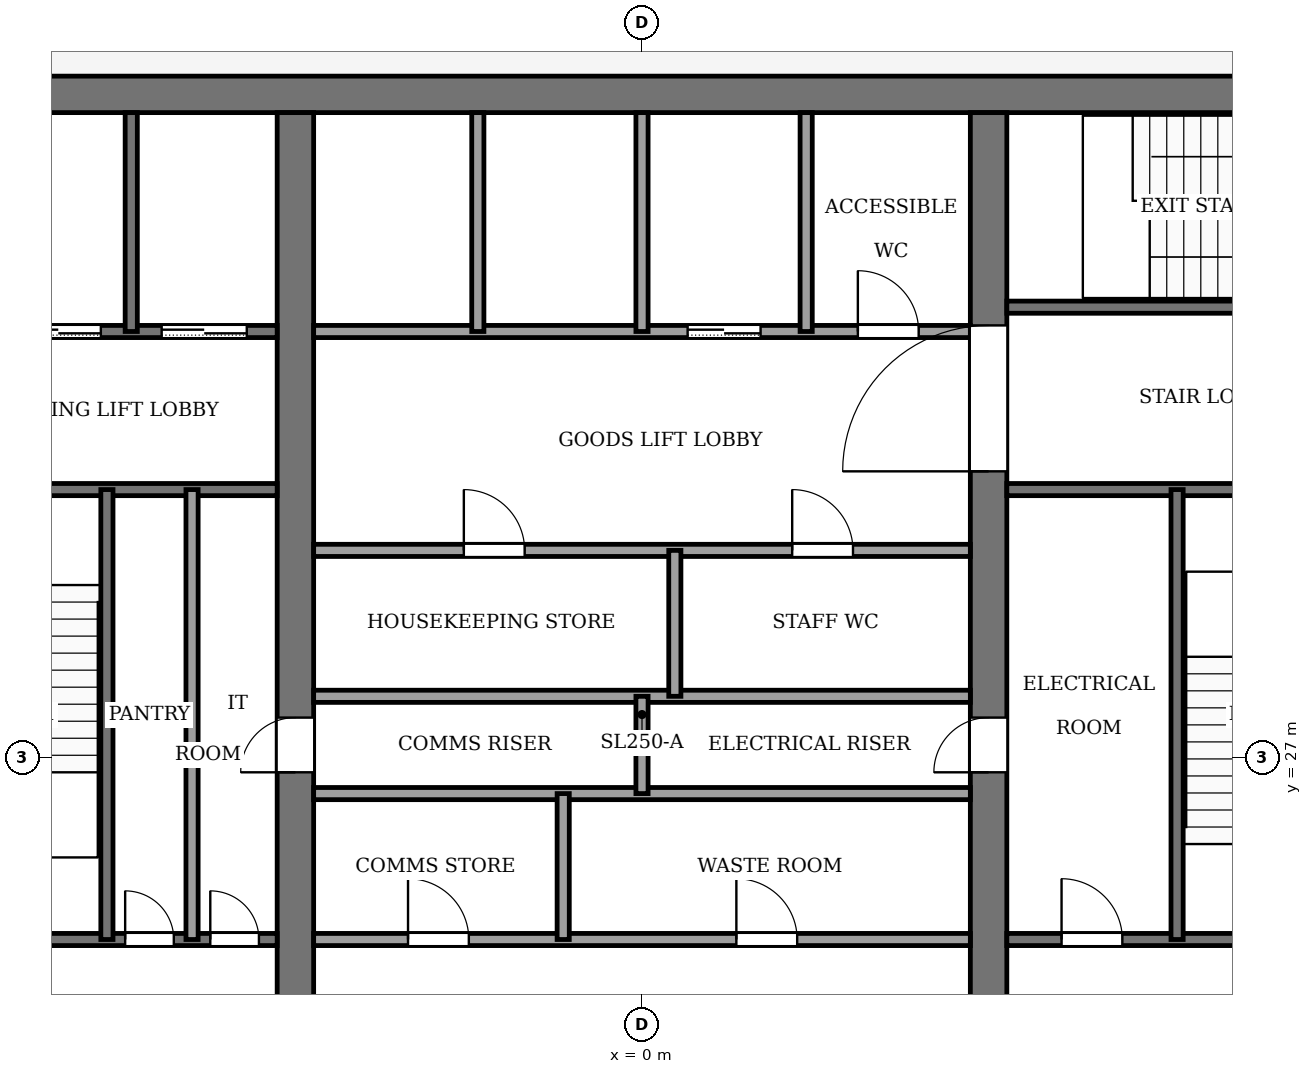
"""IFC4 building model, lengths in metres.
Left out: names, types, materials, properties, quantities, classifications, styles, units other than length and angle.
Written with IfcOpenShell. Run it as: python <this file> out.ifc"""

import sys

from ifc_helpers import new_model, si_unit, direction, frame, frame_2d, origin, place, context, subcontext, project, spatial, rectangle, extrude, element, fill, save


model = new_model("IFC4")
c1 = context("Model", 3, precision=1e-05, world=origin(), true_north=direction((0.0, 1.0)))
c2 = subcontext(c1, "Body", "Model", "MODEL_VIEW")
j1 = project(units=[si_unit("LENGTHUNIT", "METRE"), si_unit("PLANEANGLEUNIT", "RADIAN")], contexts=[c1])
p1 = place(None, origin())
s1 = spatial("IfcSite", under=j1, at=p1, CompositionType="ELEMENT")
p2 = place(p1, origin())
s2 = spatial("IfcBuilding", under=s1, at=p2, CompositionType="ELEMENT")
p3 = place(p2, frame((0.0, 0.0, 318.0)))
s3 = spatial("IfcBuildingStorey", under=s2, at=p3, CompositionType="ELEMENT", Elevation=318.0)
p4 = place(p3, frame((-13.2, 37.9, -0.13), z_axis=(0.0, 0.0, 1.0), x_axis=(1.0, 0.0, 0.0)))
e1 = element("IfcWall", 1, at=p4, inside=s3, PredefinedType="SHEAR", context=c2, shape_type="SweptSolid", body=[
    extrude(rectangle(XDim=26.4, YDim=0.6, at=frame_2d((13.2, 0.0))), origin(), (0.0, 0.0, 1.0), 4.0),
])
p5 = place(p3, frame((-5.7, 18.4, -0.13), z_axis=(0.0, 0.0, 1.0), x_axis=(0.0, 1.0, 0.0)))
e2 = element("IfcWall", 2, at=p5, inside=s3, PredefinedType="SHEAR", context=c2, shape_type="SweptSolid", body=[
    extrude(rectangle(XDim=19.2, YDim=0.6, at=frame_2d((9.6, 0.0))), origin(), (0.0, 0.0, 1.0), 4.0),
])
p6 = place(p5, frame((8.35, 0.0, 0.13)))
e3 = element("IfcOpeningElement", 3, at=p6, cuts=e2, PredefinedType="OPENING", context=c2, shape_type="SweptSolid", body=[
    extrude(rectangle(XDim=0.9, YDim=2.1, at=frame_2d((0.45, 1.05))), frame((0.0, 0.31, 0.0), z_axis=(0.0, -1.0, 0.0), x_axis=(1.0, 0.0, 0.0)), (0.0, 0.0, 1.0), 0.62),
])
p7 = place(p3, frame((5.7, 18.4, -0.13), z_axis=(0.0, 0.0, 1.0), x_axis=(0.0, 1.0, 0.0)))
e4 = element("IfcWall", 4, at=p7, inside=s3, PredefinedType="SHEAR", context=c2, shape_type="SweptSolid", body=[
    extrude(rectangle(XDim=19.2, YDim=0.6, at=frame_2d((9.6, 0.0))), origin(), (0.0, 0.0, 1.0), 4.0),
])
p8 = place(p7, frame((8.35, 0.0, 0.13)))
e5 = element("IfcOpeningElement", 5, at=p8, cuts=e4, PredefinedType="OPENING", context=c2, shape_type="SweptSolid", body=[
    extrude(rectangle(XDim=0.9, YDim=2.1, at=frame_2d((0.45, 1.05))), frame((0.0, 0.31, 0.0), z_axis=(0.0, -1.0, 0.0), x_axis=(1.0, 0.0, 0.0)), (0.0, 0.0, 1.0), 0.62),
])
p9 = place(p7, frame((13.3, 0.0, 0.13)))
e6 = element("IfcOpeningElement", 6, at=p9, cuts=e4, PredefinedType="OPENING", context=c2, shape_type="SweptSolid", body=[
    extrude(rectangle(XDim=2.4, YDim=2.4, at=frame_2d((1.2, 1.2))), frame((0.0, 0.31, 0.0), z_axis=(0.0, -1.0, 0.0), x_axis=(1.0, 0.0, 0.0)), (0.0, 0.0, 1.0), 0.62),
])
p10 = place(p3, frame((-12.6, 24.0, 0.0), z_axis=(0.0, 0.0, 1.0), x_axis=(1.0, 0.0, 0.0)))
e7 = element("IfcWall", 7, at=p10, inside=s3, PredefinedType="PARTITIONING", context=c2, shape_type="SweptSolid", body=[
    extrude(rectangle(XDim=6.6, YDim=0.2, at=frame_2d((3.3, 0.0))), origin(), (0.0, 0.0, 1.0), 3.87),
])
p11 = place(p10, frame((4.1, 0.0, 0.0)))
e8 = element("IfcOpeningElement", 8, at=p11, cuts=e7, PredefinedType="OPENING", context=c2, shape_type="SweptSolid", body=[
    extrude(rectangle(XDim=0.8, YDim=2.1, at=frame_2d((0.4, 1.05))), frame((0.0, 0.11, 0.0), z_axis=(0.0, -1.0, 0.0), x_axis=(1.0, 0.0, 0.0)), (0.0, 0.0, 1.0), 0.22),
])
p12 = place(p10, frame((5.5, 0.0, 0.0)))
e9 = element("IfcOpeningElement", 9, at=p12, cuts=e7, PredefinedType="OPENING", context=c2, shape_type="SweptSolid", body=[
    extrude(rectangle(XDim=0.8, YDim=2.1, at=frame_2d((0.4, 1.05))), frame((0.0, 0.11, 0.0), z_axis=(0.0, -1.0, 0.0), x_axis=(1.0, 0.0, 0.0)), (0.0, 0.0, 1.0), 0.22),
])
p13 = place(p3, frame((-5.4, 24.0, 0.0), z_axis=(0.0, 0.0, 1.0), x_axis=(1.0, 0.0, 0.0)))
e10 = element("IfcWall", 10, at=p13, inside=s3, PredefinedType="PARTITIONING", context=c2, shape_type="SweptSolid", body=[
    extrude(rectangle(XDim=10.8, YDim=0.2, at=frame_2d((5.4, 0.0))), origin(), (0.0, 0.0, 1.0), 3.87),
])
p14 = place(p13, frame((1.552, 0.0, 0.0)))
e11 = element("IfcOpeningElement", 11, at=p14, cuts=e10, PredefinedType="OPENING", context=c2, shape_type="SweptSolid", body=[
    extrude(rectangle(XDim=1.0, YDim=2.1, at=frame_2d((0.5, 1.05))), frame((0.0, 0.11, 0.0), z_axis=(0.0, -1.0, 0.0), x_axis=(1.0, 0.0, 0.0)), (0.0, 0.0, 1.0), 0.22),
])
p15 = place(p13, frame((6.952, 0.0, 0.0)))
e12 = element("IfcOpeningElement", 12, at=p15, cuts=e10, PredefinedType="OPENING", context=c2, shape_type="SweptSolid", body=[
    extrude(rectangle(XDim=1.0, YDim=2.1, at=frame_2d((0.5, 1.05))), frame((0.0, 0.11, 0.0), z_axis=(0.0, -1.0, 0.0), x_axis=(1.0, 0.0, 0.0)), (0.0, 0.0, 1.0), 0.22),
])
p16 = place(p3, frame((6.0, 24.0, 0.0), z_axis=(0.0, 0.0, 1.0), x_axis=(1.0, 0.0, 0.0)))
e13 = element("IfcWall", 13, at=p16, inside=s3, PredefinedType="PARTITIONING", context=c2, shape_type="SweptSolid", body=[
    extrude(rectangle(XDim=6.6, YDim=0.2, at=frame_2d((3.3, 0.0))), origin(), (0.0, 0.0, 1.0), 3.87),
])
p17 = place(p16, frame((0.9, 0.0, 0.0)))
e14 = element("IfcOpeningElement", 14, at=p17, cuts=e13, PredefinedType="OPENING", context=c2, shape_type="SweptSolid", body=[
    extrude(rectangle(XDim=1.0, YDim=2.1, at=frame_2d((0.5, 1.05))), frame((0.0, 0.11, 0.0), z_axis=(0.0, -1.0, 0.0), x_axis=(1.0, 0.0, 0.0)), (0.0, 0.0, 1.0), 0.22),
])
p18 = place(p16, frame((4.4, 0.0, 0.0)))
e15 = element("IfcOpeningElement", 15, at=p18, cuts=e13, PredefinedType="OPENING", context=c2, shape_type="SweptSolid", body=[
    extrude(rectangle(XDim=1.2, YDim=2.2, at=frame_2d((0.6, 1.1))), frame((0.0, 0.11, 0.0), z_axis=(0.0, -1.0, 0.0), x_axis=(1.0, 0.0, 0.0)), (0.0, 0.0, 1.0), 0.22),
])
for number, where, z_axis, x_axis in (
    (16, (-5.4, 26.4, 0.0), (0.0, 0.0, 1.0), (1.0, 0.0, 0.0)),
    (17, (-5.4, 28.0, 0.0), (0.0, 0.0, 1.0), (1.0, 0.0, 0.0)),
):
    element("IfcWall", number, at=place(p3, frame(where, z_axis=z_axis, x_axis=x_axis)), inside=s3, PredefinedType="PARTITIONING", context=c2, shape_type="SweptSolid", body=[
        extrude(rectangle(XDim=10.8, YDim=0.2, at=frame_2d((5.4, 0.0))), origin(), (0.0, 0.0, 1.0), 3.87),
    ])
p19 = place(p3, frame((-5.4, 30.4, 0.0), z_axis=(0.0, 0.0, 1.0), x_axis=(1.0, 0.0, 0.0)))
e18 = element("IfcWall", 18, at=p19, inside=s3, PredefinedType="PARTITIONING", context=c2, shape_type="SweptSolid", body=[
    extrude(rectangle(XDim=10.8, YDim=0.2, at=frame_2d((5.4, 0.0))), origin(), (0.0, 0.0, 1.0), 3.87),
])
p20 = place(p19, frame((2.47, 0.0, 0.0)))
e19 = element("IfcOpeningElement", 19, at=p20, cuts=e18, PredefinedType="OPENING", context=c2, shape_type="SweptSolid", body=[
    extrude(rectangle(XDim=1.0, YDim=2.1, at=frame_2d((0.5, 1.05))), frame((0.0, 0.11, 0.0), z_axis=(0.0, -1.0, 0.0), x_axis=(1.0, 0.0, 0.0)), (0.0, 0.0, 1.0), 0.22),
])
p21 = place(p19, frame((7.87, 0.0, 0.0)))
e20 = element("IfcOpeningElement", 20, at=p21, cuts=e18, PredefinedType="OPENING", context=c2, shape_type="SweptSolid", body=[
    extrude(rectangle(XDim=1.0, YDim=2.1, at=frame_2d((0.5, 1.05))), frame((0.0, 0.11, 0.0), z_axis=(0.0, -1.0, 0.0), x_axis=(1.0, 0.0, 0.0)), (0.0, 0.0, 1.0), 0.22),
])
p22 = place(p3, frame((-12.6, 31.4, 0.0), z_axis=(0.0, 0.0, 1.0), x_axis=(1.0, 0.0, 0.0)))
e21 = element("IfcWall", 21, at=p22, inside=s3, PredefinedType="PARTITIONING", context=c2, shape_type="SweptSolid", body=[
    extrude(rectangle(XDim=6.6, YDim=0.2, at=frame_2d((3.3, 0.0))), origin(), (0.0, 0.0, 1.0), 3.87),
])
p23 = place(p22, frame((1.0, 0.0, 0.0)))
e22 = element("IfcOpeningElement", 22, at=p23, cuts=e21, PredefinedType="OPENING", context=c2, shape_type="SweptSolid", body=[
    extrude(rectangle(XDim=1.2, YDim=2.2, at=frame_2d((0.6, 1.1))), frame((0.0, 0.11, 0.0), z_axis=(0.0, -1.0, 0.0), x_axis=(1.0, 0.0, 0.0)), (0.0, 0.0, 1.0), 0.22),
])
p24 = place(p3, frame((6.0, 31.4, 0.0), z_axis=(0.0, 0.0, 1.0), x_axis=(1.0, 0.0, 0.0)))
e23 = element("IfcWall", 23, at=p24, inside=s3, PredefinedType="PARTITIONING", context=c2, shape_type="SweptSolid", body=[
    extrude(rectangle(XDim=6.6, YDim=0.2, at=frame_2d((3.3, 0.0))), origin(), (0.0, 0.0, 1.0), 3.87),
])
p25 = place(p3, frame((-12.6, 34.0, 0.0), z_axis=(0.0, 0.0, 1.0), x_axis=(1.0, 0.0, 0.0)))
e24 = element("IfcWall", 24, at=p25, inside=s3, PredefinedType="PARTITIONING", context=c2, shape_type="SweptSolid", body=[
    extrude(rectangle(XDim=6.6, YDim=0.2, at=frame_2d((3.3, 0.0))), origin(), (0.0, 0.0, 1.0), 3.87),
])
p26 = place(p25, frame((4.7, 0.0, 0.0)))
e25 = element("IfcOpeningElement", 25, at=p26, cuts=e24, PredefinedType="OPENING", context=c2, shape_type="SweptSolid", body=[
    extrude(rectangle(XDim=1.4, YDim=2.2, at=frame_2d((0.7, 1.1))), frame((0.0, 0.11, 0.0), z_axis=(0.0, -1.0, 0.0), x_axis=(1.0, 0.0, 0.0)), (0.0, 0.0, 1.0), 0.22),
])
p27 = place(p25, frame((2.3, 0.0, 0.0)))
e26 = element("IfcOpeningElement", 26, at=p27, cuts=e24, PredefinedType="OPENING", context=c2, shape_type="SweptSolid", body=[
    extrude(rectangle(XDim=1.4, YDim=2.2, at=frame_2d((0.7, 1.1))), frame((0.0, 0.11, 0.0), z_axis=(0.0, -1.0, 0.0), x_axis=(1.0, 0.0, 0.0)), (0.0, 0.0, 1.0), 0.22),
])
p28 = place(p25, frame((0.45, 0.0, 0.0)))
e27 = element("IfcOpeningElement", 27, at=p28, cuts=e24, PredefinedType="OPENING", context=c2, shape_type="SweptSolid", body=[
    extrude(rectangle(XDim=0.9, YDim=2.1, at=frame_2d((0.45, 1.05))), frame((0.0, 0.11, 0.0), z_axis=(0.0, -1.0, 0.0), x_axis=(1.0, 0.0, 0.0)), (0.0, 0.0, 1.0), 0.22),
])
p29 = place(p3, frame((-5.4, 34.0, 0.0), z_axis=(0.0, 0.0, 1.0), x_axis=(1.0, 0.0, 0.0)))
e28 = element("IfcWall", 28, at=p29, inside=s3, PredefinedType="PARTITIONING", context=c2, shape_type="SweptSolid", body=[
    extrude(rectangle(XDim=10.8, YDim=0.2, at=frame_2d((5.4, 0.0))), origin(), (0.0, 0.0, 1.0), 3.87),
])
p30 = place(p29, frame((6.15, 0.0, 0.0)))
e29 = element("IfcOpeningElement", 29, at=p30, cuts=e28, PredefinedType="OPENING", context=c2, shape_type="SweptSolid", body=[
    extrude(rectangle(XDim=1.2, YDim=2.2, at=frame_2d((0.6, 1.1))), frame((0.0, 0.11, 0.0), z_axis=(0.0, -1.0, 0.0), x_axis=(1.0, 0.0, 0.0)), (0.0, 0.0, 1.0), 0.22),
])
p31 = place(p29, frame((8.95, 0.0, 0.0)))
e30 = element("IfcOpeningElement", 30, at=p31, cuts=e28, PredefinedType="OPENING", context=c2, shape_type="SweptSolid", body=[
    extrude(rectangle(XDim=1.0, YDim=2.1, at=frame_2d((0.5, 1.05))), frame((0.0, 0.11, 0.0), z_axis=(0.0, -1.0, 0.0), x_axis=(1.0, 0.0, 0.0)), (0.0, 0.0, 1.0), 0.22),
])
p32 = place(p3, frame((6.0, 34.4, 0.0), z_axis=(0.0, 0.0, 1.0), x_axis=(1.0, 0.0, 0.0)))
e31 = element("IfcWall", 31, at=p32, inside=s3, PredefinedType="PARTITIONING", context=c2, shape_type="SweptSolid", body=[
    extrude(rectangle(XDim=6.6, YDim=0.2, at=frame_2d((3.3, 0.0))), origin(), (0.0, 0.0, 1.0), 3.87),
])
p33 = place(p32, frame((4.8, 0.0, 0.0)))
e32 = element("IfcOpeningElement", 32, at=p33, cuts=e31, PredefinedType="OPENING", context=c2, shape_type="SweptSolid", body=[
    extrude(rectangle(XDim=1.2, YDim=2.2, at=frame_2d((0.6, 1.1))), frame((0.0, 0.11, 0.0), z_axis=(0.0, -1.0, 0.0), x_axis=(1.0, 0.0, 0.0)), (0.0, 0.0, 1.0), 0.22),
])
p34 = place(p3, frame((-8.8, 24.0, 0.0), z_axis=(0.0, 0.0, 1.0), x_axis=(0.0, 1.0, 0.0)))
e33 = element("IfcWall", 33, at=p34, inside=s3, PredefinedType="PARTITIONING", context=c2, shape_type="SweptSolid", body=[
    extrude(rectangle(XDim=7.4, YDim=0.2, at=frame_2d((3.7, 0.0))), origin(), (0.0, 0.0, 1.0), 3.87),
])
p35 = place(p3, frame((-8.4, 34.0, 0.0), z_axis=(0.0, 0.0, 1.0), x_axis=(0.0, 1.0, 0.0)))
e34 = element("IfcWall", 34, at=p35, inside=s3, PredefinedType="PARTITIONING", context=c2, shape_type="SweptSolid", body=[
    extrude(rectangle(XDim=3.6, YDim=0.2, at=frame_2d((1.8, 0.0))), origin(), (0.0, 0.0, 1.0), 3.87),
])
p36 = place(p3, frame((-7.4, 24.0, 0.0), z_axis=(0.0, 0.0, 1.0), x_axis=(0.0, 1.0, 0.0)))
e35 = element("IfcWall", 35, at=p36, inside=s3, PredefinedType="PARTITIONING", context=c2, shape_type="SweptSolid", body=[
    extrude(rectangle(XDim=7.4, YDim=0.2, at=frame_2d((3.7, 0.0))), origin(), (0.0, 0.0, 1.0), 3.87),
])
p37 = place(p3, frame((-2.7, 34.0, 0.0), z_axis=(0.0, 0.0, 1.0), x_axis=(0.0, 1.0, 0.0)))
e36 = element("IfcWall", 36, at=p37, inside=s3, PredefinedType="PARTITIONING", context=c2, shape_type="SweptSolid", body=[
    extrude(rectangle(XDim=3.6, YDim=0.2, at=frame_2d((1.8, 0.0))), origin(), (0.0, 0.0, 1.0), 3.87),
])
p38 = place(p3, frame((-1.296, 24.0, 0.0), z_axis=(0.0, 0.0, 1.0), x_axis=(0.0, 1.0, 0.0)))
e37 = element("IfcWall", 37, at=p38, inside=s3, PredefinedType="PARTITIONING", context=c2, shape_type="SweptSolid", body=[
    extrude(rectangle(XDim=2.4, YDim=0.2, at=frame_2d((1.2, 0.0))), origin(), (0.0, 0.0, 1.0), 3.87),
])
p39 = place(p3, frame((0.0, 26.4, 0.0), z_axis=(0.0, 0.0, 1.0), x_axis=(0.0, 1.0, 0.0)))
e38 = element("IfcWall", 38, at=p39, inside=s3, PredefinedType="PARTITIONING", context=c2, shape_type="SweptSolid", body=[
    extrude(rectangle(XDim=1.6, YDim=0.2, at=frame_2d((0.8, 0.0))), origin(), (0.0, 0.0, 1.0), 3.87),
])
p40 = place(p3, frame((0.0, 34.0, 0.0), z_axis=(0.0, 0.0, 1.0), x_axis=(0.0, 1.0, 0.0)))
e39 = element("IfcWall", 39, at=p40, inside=s3, PredefinedType="PARTITIONING", context=c2, shape_type="SweptSolid", body=[
    extrude(rectangle(XDim=3.6, YDim=0.2, at=frame_2d((1.8, 0.0))), origin(), (0.0, 0.0, 1.0), 3.87),
])
p41 = place(p3, frame((0.54, 28.0, 0.0), z_axis=(0.0, 0.0, 1.0), x_axis=(0.0, 1.0, 0.0)))
e40 = element("IfcWall", 40, at=p41, inside=s3, PredefinedType="PARTITIONING", context=c2, shape_type="SweptSolid", body=[
    extrude(rectangle(XDim=2.4, YDim=0.2, at=frame_2d((1.2, 0.0))), origin(), (0.0, 0.0, 1.0), 3.87),
])
p42 = place(p3, frame((2.7, 34.0, 0.0), z_axis=(0.0, 0.0, 1.0), x_axis=(0.0, 1.0, 0.0)))
e41 = element("IfcWall", 41, at=p42, inside=s3, PredefinedType="PARTITIONING", context=c2, shape_type="SweptSolid", body=[
    extrude(rectangle(XDim=3.6, YDim=0.2, at=frame_2d((1.8, 0.0))), origin(), (0.0, 0.0, 1.0), 3.87),
])
p43 = place(p3, frame((8.8, 24.0, 0.0), z_axis=(0.0, 0.0, 1.0), x_axis=(0.0, 1.0, 0.0)))
e42 = element("IfcWall", 42, at=p43, inside=s3, PredefinedType="PARTITIONING", context=c2, shape_type="SweptSolid", body=[
    extrude(rectangle(XDim=7.4, YDim=0.2, at=frame_2d((3.7, 0.0))), origin(), (0.0, 0.0, 1.0), 3.87),
])
p44 = place(p30, origin())
e43 = element("IfcDoor", 43, at=p44, inside=s3, OperationType="SLIDING_TO_LEFT", PredefinedType="DOOR", context=c2, shape_type="SweptSolid", body=[
    extrude(rectangle(XDim=1.2, YDim=2.2, at=frame_2d((0.6, 1.1))), frame((0.0, 0.025, 0.0), z_axis=(0.0, -1.0, 0.0), x_axis=(1.0, 0.0, 0.0)), (0.0, 0.0, 1.0), 0.05),
])
fill(e29, e43)
p45 = place(p26, origin())
e44 = element("IfcDoor", 44, at=p45, inside=s3, OperationType="SLIDING_TO_LEFT", PredefinedType="DOOR", context=c2, shape_type="SweptSolid", body=[
    extrude(rectangle(XDim=1.4, YDim=2.2, at=frame_2d((0.7, 1.1))), frame((0.0, 0.025, 0.0), z_axis=(0.0, -1.0, 0.0), x_axis=(1.0, 0.0, 0.0)), (0.0, 0.0, 1.0), 0.05),
])
fill(e25, e44)
p46 = place(p27, origin())
e45 = element("IfcDoor", 45, at=p46, inside=s3, OperationType="SLIDING_TO_LEFT", PredefinedType="DOOR", context=c2, shape_type="SweptSolid", body=[
    extrude(rectangle(XDim=1.4, YDim=2.2, at=frame_2d((0.7, 1.1))), frame((0.0, 0.025, 0.0), z_axis=(0.0, -1.0, 0.0), x_axis=(1.0, 0.0, 0.0)), (0.0, 0.0, 1.0), 0.05),
])
fill(e26, e45)
p47 = place(p14, origin())
e46 = element("IfcDoor", 46, at=p47, inside=s3, OperationType="SINGLE_SWING_LEFT", PredefinedType="DOOR", context=c2, shape_type="SweptSolid", body=[
    extrude(rectangle(XDim=1.0, YDim=2.1, at=frame_2d((0.5, 1.05))), frame((0.0, 0.025, 0.0), z_axis=(0.0, -1.0, 0.0), x_axis=(1.0, 0.0, 0.0)), (0.0, 0.0, 1.0), 0.05),
])
fill(e11, e46)
p48 = place(p15, origin())
e47 = element("IfcDoor", 47, at=p48, inside=s3, OperationType="SINGLE_SWING_RIGHT", PredefinedType="DOOR", context=c2, shape_type="SweptSolid", body=[
    extrude(rectangle(XDim=1.0, YDim=2.1, at=frame_2d((0.5, 1.05))), frame((0.0, 0.025, 0.0), z_axis=(0.0, -1.0, 0.0), x_axis=(1.0, 0.0, 0.0)), (0.0, 0.0, 1.0), 0.05),
])
fill(e12, e47)
p49 = place(p20, origin())
e48 = element("IfcDoor", 48, at=p49, inside=s3, OperationType="SINGLE_SWING_RIGHT", PredefinedType="DOOR", context=c2, shape_type="SweptSolid", body=[
    extrude(rectangle(XDim=1.0, YDim=2.1, at=frame_2d((0.5, 1.05))), frame((0.0, 0.025, 0.0), z_axis=(0.0, -1.0, 0.0), x_axis=(1.0, 0.0, 0.0)), (0.0, 0.0, 1.0), 0.05),
])
fill(e19, e48)
p50 = place(p21, origin())
e49 = element("IfcDoor", 49, at=p50, inside=s3, OperationType="SINGLE_SWING_LEFT", PredefinedType="DOOR", context=c2, shape_type="SweptSolid", body=[
    extrude(rectangle(XDim=1.0, YDim=2.1, at=frame_2d((0.5, 1.05))), frame((0.0, 0.025, 0.0), z_axis=(0.0, -1.0, 0.0), x_axis=(1.0, 0.0, 0.0)), (0.0, 0.0, 1.0), 0.05),
])
fill(e20, e49)
p51 = place(p11, origin())
e50 = element("IfcDoor", 50, at=p51, inside=s3, OperationType="SINGLE_SWING_LEFT", PredefinedType="DOOR", context=c2, shape_type="SweptSolid", body=[
    extrude(rectangle(XDim=0.8, YDim=2.1, at=frame_2d((0.4, 1.05))), frame((0.0, 0.025, 0.0), z_axis=(0.0, -1.0, 0.0), x_axis=(1.0, 0.0, 0.0)), (0.0, 0.0, 1.0), 0.05),
])
fill(e8, e50)
p52 = place(p12, origin())
e51 = element("IfcDoor", 51, at=p52, inside=s3, OperationType="SINGLE_SWING_RIGHT", PredefinedType="DOOR", context=c2, shape_type="SweptSolid", body=[
    extrude(rectangle(XDim=0.8, YDim=2.1, at=frame_2d((0.4, 1.05))), frame((0.0, 0.025, 0.0), z_axis=(0.0, -1.0, 0.0), x_axis=(1.0, 0.0, 0.0)), (0.0, 0.0, 1.0), 0.05),
])
fill(e9, e51)
p53 = place(p17, origin())
e52 = element("IfcDoor", 52, at=p53, inside=s3, OperationType="SINGLE_SWING_RIGHT", PredefinedType="DOOR", context=c2, shape_type="SweptSolid", body=[
    extrude(rectangle(XDim=1.0, YDim=2.1, at=frame_2d((0.5, 1.05))), frame((0.0, 0.025, 0.0), z_axis=(0.0, -1.0, 0.0), x_axis=(1.0, 0.0, 0.0)), (0.0, 0.0, 1.0), 0.05),
])
fill(e14, e52)
p54 = place(p31, origin())
e53 = element("IfcDoor", 53, at=p54, inside=s3, OperationType="SINGLE_SWING_LEFT", PredefinedType="DOOR", context=c2, shape_type="SweptSolid", body=[
    extrude(rectangle(XDim=1.0, YDim=2.1, at=frame_2d((0.5, 1.05))), frame((0.0, 0.025, 0.0), z_axis=(0.0, -1.0, 0.0), x_axis=(1.0, 0.0, 0.0)), (0.0, 0.0, 1.0), 0.05),
])
fill(e30, e53)
p55 = place(p6, origin())
e54 = element("IfcDoor", 54, at=p55, inside=s3, OperationType="SINGLE_SWING_LEFT", PredefinedType="DOOR", context=c2, shape_type="SweptSolid", body=[
    extrude(rectangle(XDim=0.9, YDim=2.1, at=frame_2d((0.45, 1.05))), frame((0.0, 0.025, 0.0), z_axis=(0.0, -1.0, 0.0), x_axis=(1.0, 0.0, 0.0)), (0.0, 0.0, 1.0), 0.05),
])
fill(e3, e54)
p56 = place(p8, origin())
e55 = element("IfcDoor", 55, at=p56, inside=s3, OperationType="SINGLE_SWING_RIGHT", PredefinedType="DOOR", context=c2, shape_type="SweptSolid", body=[
    extrude(rectangle(XDim=0.9, YDim=2.1, at=frame_2d((0.45, 1.05))), frame((0.0, 0.025, 0.0), z_axis=(0.0, -1.0, 0.0), x_axis=(1.0, 0.0, 0.0)), (0.0, 0.0, 1.0), 0.05),
])
fill(e5, e55)
p57 = place(p9, origin())
e56 = element("IfcDoor", 56, at=p57, inside=s3, OperationType="DOUBLE_DOOR_SINGLE_SWING", PredefinedType="DOOR", context=c2, shape_type="SweptSolid", body=[
    extrude(rectangle(XDim=2.4, YDim=2.4, at=frame_2d((1.2, 1.2))), frame((0.0, 0.025, 0.0), z_axis=(0.0, -1.0, 0.0), x_axis=(1.0, 0.0, 0.0)), (0.0, 0.0, 1.0), 0.05),
])
fill(e6, e56)
save(model, sys.argv[1])
